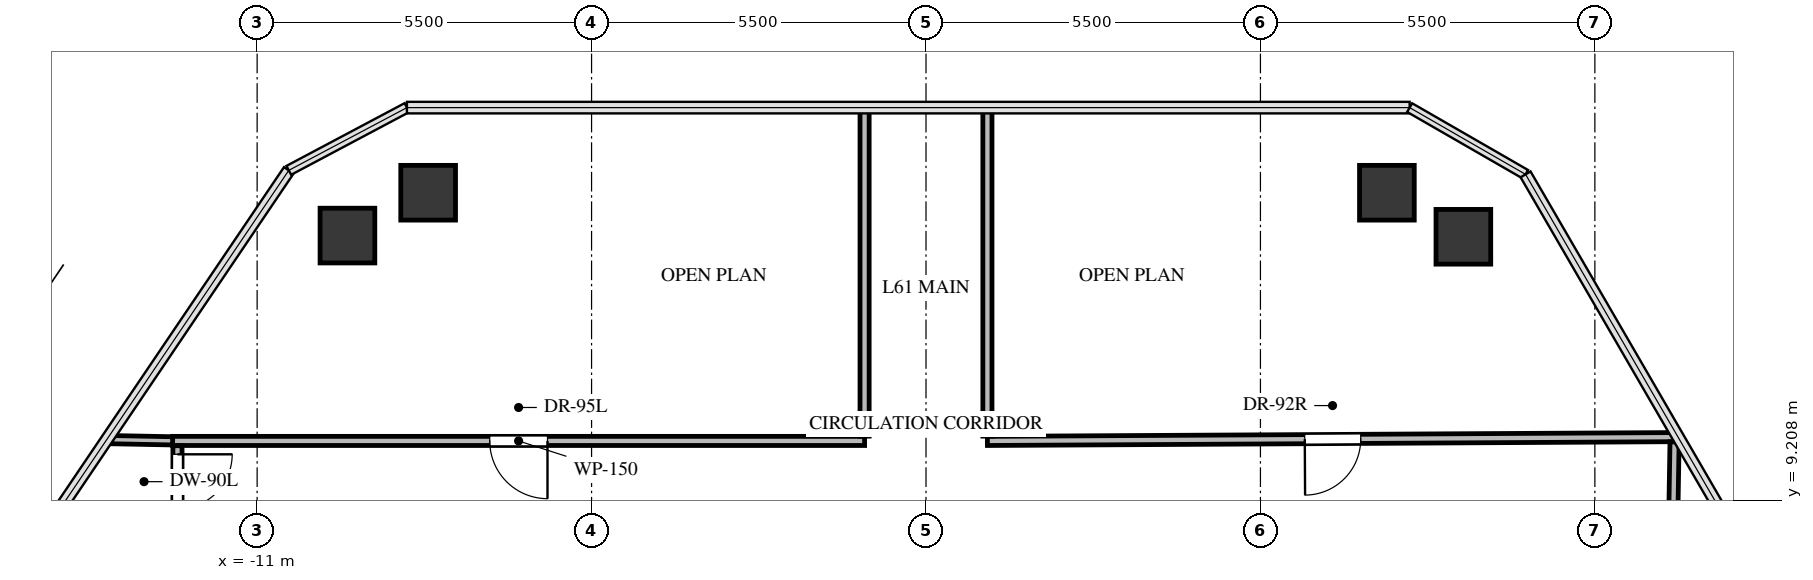
"""IFC4 building model, lengths in metres.
Left out: names, types, materials, properties, quantities, classifications, styles, units other than length and angle.
Written with IfcOpenShell. Run it as: python <this file> out.ifc"""

import sys

from ifc_helpers import new_model, si_unit, direction, frame, frame_2d, origin, origin_2d, place, context, subcontext, project, spatial, rectangle, extrude, source, transform, mapped, element, fill, save


model = new_model("IFC4")
c1 = context("Model", 3, precision=1e-05, world=origin(), true_north=direction((0.0, 1.0)))
c2 = subcontext(c1, "Body", "Model", "MODEL_VIEW")
j1 = project(units=[si_unit("LENGTHUNIT", "METRE"), si_unit("PLANEANGLEUNIT", "RADIAN")], contexts=[c1])
p1 = place(None, origin())
s1 = spatial("IfcSite", under=j1, at=p1, CompositionType="ELEMENT")
p2 = place(p1, origin())
s2 = spatial("IfcBuilding", under=s1, at=p2, CompositionType="ELEMENT")
p3 = place(p2, frame((0.0, 0.0, 221.6)))
s3 = spatial("IfcBuildingStorey", under=s2, at=p3, CompositionType="ELEMENT", Elevation=221.6)
m1 = source(origin(), c2, "Body", "SweptSolid", [
    extrude(rectangle(XDim=0.9, YDim=0.9, at=origin_2d()), origin(), (0.0, 0.0, 1.0), 3.3),
])
for number, where, z_axis, x_axis in (
    (1, (-9.515, 13.557, -0.24), (0.0, 0.0, 1.0), (1.0, 0.0, 0.0)),
    (2, (-8.188, 14.262, -0.24), (0.0, 0.0, 1.0), (1.0, 0.0, 0.0)),
    (3, (7.58, 14.262, -0.24), (0.0, 0.0, 1.0), (1.0, 0.0, 0.0)),
    (4, (8.837, 13.538, -0.24), (0.0, 0.0, 1.0), (1.0, 0.0, 0.0)),
):
    element("IfcColumn", number, at=place(p3, frame(where, z_axis=z_axis, x_axis=x_axis)), inside=s3, PredefinedType="COLUMN", context=c2, shape_type="MappedRepresentation", body=[
        mapped(m1, transform((0.0, 0.0, 0.0), x_axis=(1.0, 0.0, 0.0), y_axis=(0.0, 1.0, 0.0), z_axis=(0.0, 0.0, 1.0), scale=1.0)),
    ])
p4 = place(p3, frame((-1.01, 10.18, 0.0), z_axis=(0.0, 0.0, 1.0), x_axis=(-1.0, 0.0, 0.0)))
e5 = element("IfcWall", 5, at=p4, inside=s3, PredefinedType="PARTITIONING", context=c2, shape_type="SweptSolid", body=[
    extrude(rectangle(XDim=11.38, YDim=0.15, at=frame_2d((5.69, 0.0))), origin(), (0.0, 0.0, 1.0), 2.301),
])
p5 = place(p4, frame((5.215, 0.0, 0.0)))
e6 = element("IfcOpeningElement", 6, at=p5, cuts=e5, PredefinedType="OPENING", context=c2, shape_type="SweptSolid", body=[
    extrude(rectangle(XDim=0.95, YDim=2.1, at=frame_2d((0.475, 1.05))), frame((0.0, 0.085, 0.0), z_axis=(0.0, -1.0, 0.0), x_axis=(1.0, 0.0, 0.0)), (0.0, 0.0, 1.0), 0.17),
])
p6 = place(p3, frame((-1.01, 15.662, 0.0), z_axis=(0.0, 0.0, 1.0), x_axis=(0.0, -1.0, 0.0)))
e7 = element("IfcWall", 7, at=p6, inside=s3, PredefinedType="PARTITIONING", context=c2, shape_type="SweptSolid", body=[
    extrude(rectangle(XDim=5.403, YDim=0.15, at=frame_2d((2.702, 0.0))), origin(), (0.0, 0.0, 1.0), 2.399),
])
p7 = place(p3, frame((12.368, 10.243, 0.0), z_axis=(0.0, 0.0, 1.0), x_axis=(-0.999984623931, -0.005545439622, 0.0)))
e8 = element("IfcWall", 8, at=p7, inside=s3, PredefinedType="PARTITIONING", context=c2, shape_type="SweptSolid", body=[
    extrude(rectangle(XDim=11.359, YDim=0.15, at=frame_2d((5.679, 0.0))), origin(), (0.0, 0.0, 1.0), 2.301),
])
p8 = place(p7, frame((5.219, 0.0, 0.0)))
e9 = element("IfcOpeningElement", 9, at=p8, cuts=e8, PredefinedType="OPENING", context=c2, shape_type="SweptSolid", body=[
    extrude(rectangle(XDim=0.92, YDim=2.1, at=frame_2d((0.46, 1.05))), frame((0.0, 0.085, 0.0), z_axis=(0.0, -1.0, 0.0), x_axis=(1.0, 0.0, 0.0)), (0.0, 0.0, 1.0), 0.17),
])
p9 = place(p3, frame((1.01, 10.259, 0.0), z_axis=(0.0, 0.0, 1.0), x_axis=(0.0, 1.0, 0.0)))
e10 = element("IfcWall", 10, at=p9, inside=s3, PredefinedType="PARTITIONING", context=c2, shape_type="SweptSolid", body=[
    extrude(rectangle(XDim=5.403, YDim=0.15, at=frame_2d((2.702, 0.0))), origin(), (0.0, 0.0, 1.0), 2.399),
])
p10 = place(p3, frame((-12.31, 10.101, 0.0), z_axis=(0.0, 0.0, 1.0), x_axis=(0.0, -1.0, 0.0)))
e11 = element("IfcWall", 11, at=p10, inside=s3, PredefinedType="PARTITIONING", context=c2, shape_type="SweptSolid", body=[
    extrude(rectangle(XDim=1.182, YDim=0.15, at=frame_2d((0.591, 0.0))), origin(), (0.0, 0.0, 1.0), 2.399),
])
p11 = place(p10, frame((0.141, 0.0, 0.0)))
e12 = element("IfcOpeningElement", 12, at=p11, cuts=e11, PredefinedType="OPENING", context=c2, shape_type="SweptSolid", body=[
    extrude(rectangle(XDim=0.9, YDim=2.05, at=frame_2d((0.45, 1.025))), frame((0.0, 0.085, 0.0), z_axis=(0.0, -1.0, 0.0), x_axis=(1.0, 0.0, 0.0)), (0.0, 0.0, 1.0), 0.17),
])
p12 = place(p3, frame((12.181, 2.49, 0.0), z_axis=(0.0, 0.0, 1.0), x_axis=(0.016828134389, 0.999858396921, 0.0)))
e13 = element("IfcWall", 13, at=p12, inside=s3, PredefinedType="PARTITIONING", context=c2, shape_type="SweptSolid", body=[
    extrude(rectangle(XDim=7.675, YDim=0.15, at=frame_2d((3.837, 0.0))), origin(), (0.0, 0.0, 1.0), 2.399),
])
p13 = place(p12, frame((3.377, 0.0, 0.0)))
e14 = element("IfcOpeningElement", 14, at=p13, cuts=e13, PredefinedType="OPENING", context=c2, shape_type="SweptSolid", body=[
    extrude(rectangle(XDim=0.92, YDim=2.1, at=frame_2d((0.46, 1.05))), frame((0.0, 0.085, 0.0), z_axis=(0.0, -1.0, 0.0), x_axis=(1.0, 0.0, 0.0)), (0.0, 0.0, 1.0), 0.17),
])
p14 = place(p3, frame((-12.39, 10.181, 0.0), z_axis=(0.0, 0.0, 1.0), x_axis=(-0.999812128272, 0.019383192748, 0.0)))
e15 = element("IfcWall", 15, at=p14, inside=s3, PredefinedType="PARTITIONING", context=c2, shape_type="SweptSolid", body=[
    extrude(rectangle(XDim=1.083, YDim=0.135, at=frame_2d((0.542, 0.0))), origin(), (0.0, 0.0, 1.0), 3.045),
])
m2 = source(origin(), c2, "Body", "SweptSolid", [
    extrude(rectangle(XDim=0.95, YDim=2.1, at=frame_2d((0.475, 1.05))), frame((0.0, 0.025, 0.0), z_axis=(0.0, -1.0, 0.0), x_axis=(1.0, 0.0, 0.0)), (0.0, 0.0, 1.0), 0.05),
])
p15 = place(p5, origin())
e16 = element("IfcDoor", 16, at=p15, inside=s3, OperationType="SINGLE_SWING_LEFT", PredefinedType="DOOR", context=c2, shape_type="MappedRepresentation", body=[
    mapped(m2, transform((0.0, 0.0, 0.0), x_axis=(1.0, 0.0, 0.0), y_axis=(0.0, 1.0, 0.0), z_axis=(0.0, 0.0, 1.0), scale=1.0)),
])
fill(e6, e16)
m3 = source(origin(), c2, "Body", "SweptSolid", [
    extrude(rectangle(XDim=0.92, YDim=2.1, at=frame_2d((0.46, 1.05))), frame((0.0, 0.025, 0.0), z_axis=(0.0, -1.0, 0.0), x_axis=(1.0, 0.0, 0.0)), (0.0, 0.0, 1.0), 0.05),
])
p16 = place(p8, origin())
e17 = element("IfcDoor", 17, at=p16, inside=s3, OperationType="SINGLE_SWING_RIGHT", PredefinedType="DOOR", context=c2, shape_type="MappedRepresentation", body=[
    mapped(m3, transform((0.0, 0.0, 0.0), x_axis=(1.0, 0.0, 0.0), y_axis=(0.0, 1.0, 0.0), z_axis=(0.0, 0.0, 1.0), scale=1.0)),
])
fill(e9, e17)
m4 = source(origin(), c2, "Body", "SweptSolid", [
    extrude(rectangle(XDim=0.9, YDim=2.05, at=frame_2d((0.45, 1.025))), frame((0.0, 0.025, 0.0), z_axis=(0.0, -1.0, 0.0), x_axis=(1.0, 0.0, 0.0)), (0.0, 0.0, 1.0), 0.05),
])
p17 = place(p11, origin())
e18 = element("IfcDoor", 18, at=p17, inside=s3, OperationType="SINGLE_SWING_LEFT", PredefinedType="DOOR", context=c2, shape_type="MappedRepresentation", body=[
    mapped(m4, transform((0.0, 0.0, 0.0), x_axis=(1.0, 0.0, 0.0), y_axis=(0.0, 1.0, 0.0), z_axis=(0.0, 0.0, 1.0), scale=1.0)),
])
fill(e12, e18)
save(model, sys.argv[1])
